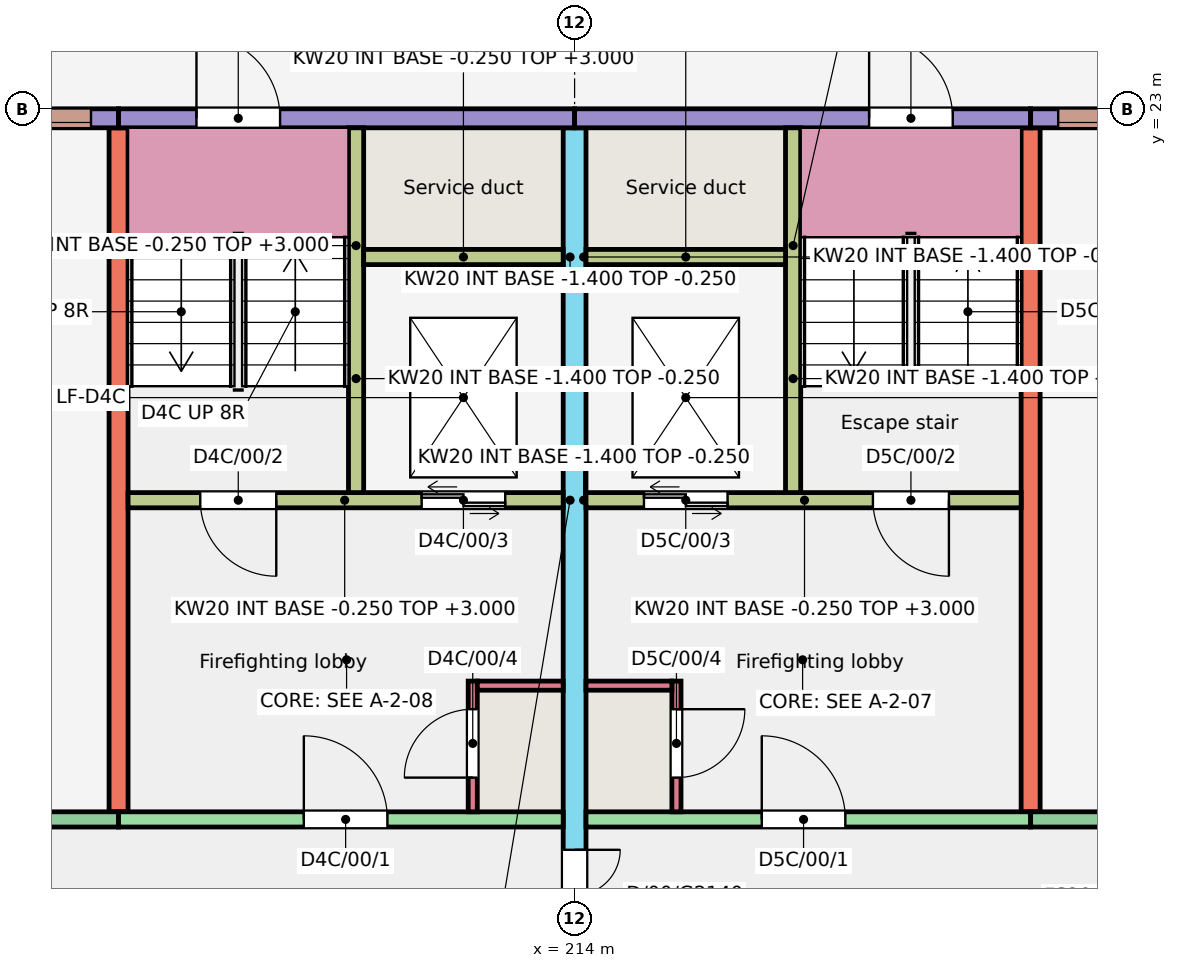
"""IFC4 building model, lengths in metres.
Left out: names, types, materials, properties, quantities, classifications, styles, units other than length and angle.
Written with IfcOpenShell. Run it as: python <this file> out.ifc"""

import sys

from ifc_helpers import new_model, si_unit, direction, frame, frame_2d, origin, place, context, subcontext, project, spatial, rectangle, extrude, element, fill, save


model = new_model("IFC4")
c1 = context("Model", 3, precision=1e-05, world=origin(), true_north=direction((0.0, 1.0)))
c2 = subcontext(c1, "Body", "Model", "MODEL_VIEW")
j1 = project(units=[si_unit("LENGTHUNIT", "METRE"), si_unit("PLANEANGLEUNIT", "RADIAN")], contexts=[c1])
p1 = place(None, origin())
s1 = spatial("IfcSite", under=j1, at=p1, CompositionType="ELEMENT")
p2 = place(p1, origin())
s2 = spatial("IfcBuilding", under=s1, at=p2, CompositionType="ELEMENT")
p3 = place(p2, origin())
s3 = spatial("IfcBuildingStorey", under=s2, at=p3, CompositionType="ELEMENT", Elevation=0.0)
p4 = place(p3, frame((208.0, 13.75, -0.25), z_axis=(0.0, 0.0, 1.0), x_axis=(0.0, 1.0, 0.0)))
e1 = element("IfcWall", 1, at=p4, inside=s3, PredefinedType="SHEAR", context=c2, shape_type="SweptSolid", body=[
    extrude(rectangle(XDim=9.0, YDim=0.25, at=frame_2d((4.5, 0.0))), origin(), (0.0, 0.0, 1.0), 3.25),
])
p5 = place(p3, frame((214.0, 11.75, -0.25), z_axis=(0.0, 0.0, 1.0), x_axis=(0.0, 1.0, 0.0)))
e2 = element("IfcWall", 2, at=p5, inside=s3, PredefinedType="SHEAR", context=c2, shape_type="SweptSolid", body=[
    extrude(rectangle(XDim=11.0, YDim=0.3, at=frame_2d((5.5, 0.0))), origin(), (0.0, 0.0, 1.0), 3.25),
])
p6 = place(p5, frame((0.3, 0.0, 0.25)))
e3 = element("IfcOpeningElement", 3, at=p6, cuts=e2, PredefinedType="OPENING", context=c2, shape_type="SweptSolid", body=[
    extrude(rectangle(XDim=1.2, YDim=2.1, at=frame_2d((0.6, 1.05))), frame((0.0, 0.16, 0.0), z_axis=(0.0, -1.0, 0.0), x_axis=(1.0, 0.0, 0.0)), (0.0, 0.0, 1.0), 0.32),
])
p7 = place(p3, frame((220.0, 13.75, -0.25), z_axis=(0.0, 0.0, 1.0), x_axis=(0.0, 1.0, 0.0)))
e4 = element("IfcWall", 4, at=p7, inside=s3, PredefinedType="SHEAR", context=c2, shape_type="SweptSolid", body=[
    extrude(rectangle(XDim=9.0, YDim=0.25, at=frame_2d((4.5, 0.0))), origin(), (0.0, 0.0, 1.0), 3.25),
])
p8 = place(p3, frame((204.4, 22.875, -0.25), z_axis=(0.0, 0.0, 1.0), x_axis=(1.0, 0.0, 0.0)))
e5 = element("IfcWall", 5, at=p8, inside=s3, PredefinedType="SOLIDWALL", context=c2, shape_type="SweptSolid", body=[
    extrude(rectangle(XDim=3.6, YDim=0.25, at=frame_2d((1.8, 0.0))), origin(), (0.0, 0.0, 1.0), 3.25),
])
p9 = place(p8, frame((2.637, 0.0, 2.05)))
e6 = element("IfcOpeningElement", 6, at=p9, cuts=e5, PredefinedType="OPENING", context=c2, shape_type="SweptSolid", body=[
    extrude(rectangle(XDim=0.6, YDim=0.6, at=frame_2d((0.3, 0.3))), frame((0.0, 0.135, 0.0), z_axis=(0.0, -1.0, 0.0), x_axis=(1.0, 0.0, 0.0)), (0.0, 0.0, 1.0), 0.27),
])
p10 = place(p8, frame((1.3, 0.0, 0.25)))
e7 = element("IfcOpeningElement", 7, at=p10, cuts=e5, PredefinedType="OPENING", context=c2, shape_type="SweptSolid", body=[
    extrude(rectangle(XDim=1.0, YDim=2.1, at=frame_2d((0.5, 1.05))), frame((0.0, 0.135, 0.0), z_axis=(0.0, -1.0, 0.0), x_axis=(1.0, 0.0, 0.0)), (0.0, 0.0, 1.0), 0.27),
])
p11 = place(p3, frame((204.4, 13.65, -0.25), z_axis=(0.0, 0.0, 1.0), x_axis=(1.0, 0.0, 0.0)))
e8 = element("IfcWall", 8, at=p11, inside=s3, PredefinedType="SOLIDWALL", context=c2, shape_type="SweptSolid", body=[
    extrude(rectangle(XDim=3.6, YDim=0.2, at=frame_2d((1.8, 0.0))), origin(), (0.0, 0.0, 1.0), 3.25),
])
p12 = place(p11, frame((1.3, 0.0, 0.25)))
e9 = element("IfcOpeningElement", 9, at=p12, cuts=e8, PredefinedType="OPENING", context=c2, shape_type="SweptSolid", body=[
    extrude(rectangle(XDim=1.0, YDim=2.1, at=frame_2d((0.5, 1.05))), frame((0.0, 0.11, 0.0), z_axis=(0.0, -1.0, 0.0), x_axis=(1.0, 0.0, 0.0)), (0.0, 0.0, 1.0), 0.22),
])
p13 = place(p3, frame((208.0, 22.875, -0.25), z_axis=(0.0, 0.0, 1.0), x_axis=(1.0, 0.0, 0.0)))
e10 = element("IfcWall", 10, at=p13, inside=s3, PredefinedType="SOLIDWALL", context=c2, shape_type="SweptSolid", body=[
    extrude(rectangle(XDim=6.0, YDim=0.25, at=frame_2d((3.0, 0.0))), origin(), (0.0, 0.0, 1.0), 3.25),
])
p14 = place(p13, frame((1.025, 0.0, 0.25)))
e11 = element("IfcOpeningElement", 11, at=p14, cuts=e10, PredefinedType="OPENING", context=c2, shape_type="SweptSolid", body=[
    extrude(rectangle(XDim=1.1, YDim=2.1, at=frame_2d((0.55, 1.05))), frame((0.0, 0.135, 0.0), z_axis=(0.0, -1.0, 0.0), x_axis=(1.0, 0.0, 0.0)), (0.0, 0.0, 1.0), 0.27),
])
p15 = place(p3, frame((208.0, 13.65, -0.25), z_axis=(0.0, 0.0, 1.0), x_axis=(1.0, 0.0, 0.0)))
e12 = element("IfcWall", 12, at=p15, inside=s3, PredefinedType="SHEAR", context=c2, shape_type="SweptSolid", body=[
    extrude(rectangle(XDim=5.85, YDim=0.2, at=frame_2d((2.925, 0.0))), origin(), (0.0, 0.0, 1.0), 3.25),
])
p16 = place(p15, frame((2.438, 0.0, 0.25)))
e13 = element("IfcOpeningElement", 13, at=p16, cuts=e12, PredefinedType="OPENING", context=c2, shape_type="SweptSolid", body=[
    extrude(rectangle(XDim=1.1, YDim=2.1, at=frame_2d((0.55, 1.05))), frame((0.0, 0.11, 0.0), z_axis=(0.0, -1.0, 0.0), x_axis=(1.0, 0.0, 0.0)), (0.0, 0.0, 1.0), 0.22),
])
p17 = place(p3, frame((208.125, 17.85, -0.25), z_axis=(0.0, 0.0, 1.0), x_axis=(1.0, 0.0, 0.0)))
e14 = element("IfcWall", 14, at=p17, inside=s3, PredefinedType="SHEAR", context=c2, shape_type="SweptSolid", body=[
    extrude(rectangle(XDim=5.725, YDim=0.2, at=frame_2d((2.863, 0.0))), origin(), (0.0, 0.0, 1.0), 3.25),
])
p18 = place(p17, frame((0.95, 0.0, 0.25)))
e15 = element("IfcOpeningElement", 15, at=p18, cuts=e14, PredefinedType="OPENING", context=c2, shape_type="SweptSolid", body=[
    extrude(rectangle(XDim=1.0, YDim=2.1, at=frame_2d((0.5, 1.05))), frame((0.0, 0.11, 0.0), z_axis=(0.0, -1.0, 0.0), x_axis=(1.0, 0.0, 0.0)), (0.0, 0.0, 1.0), 0.22),
])
p19 = place(p17, frame((3.863, 0.0, 0.25)))
e16 = element("IfcOpeningElement", 16, at=p19, cuts=e14, PredefinedType="OPENING", context=c2, shape_type="SweptSolid", body=[
    extrude(rectangle(XDim=1.1, YDim=2.1, at=frame_2d((0.55, 1.05))), frame((0.0, 0.11, 0.0), z_axis=(0.0, -1.0, 0.0), x_axis=(1.0, 0.0, 0.0)), (0.0, 0.0, 1.0), 0.22),
])
p20 = place(p3, frame((211.125, 17.95, -0.25), z_axis=(0.0, 0.0, 1.0), x_axis=(0.0, 1.0, 0.0)))
e17 = element("IfcWall", 17, at=p20, inside=s3, PredefinedType="SHEAR", context=c2, shape_type="SweptSolid", body=[
    extrude(rectangle(XDim=4.8, YDim=0.2, at=frame_2d((2.4, 0.0))), origin(), (0.0, 0.0, 1.0), 3.25),
])
p21 = place(p3, frame((211.225, 21.05, -0.25), z_axis=(0.0, 0.0, 1.0), x_axis=(1.0, 0.0, 0.0)))
e18 = element("IfcWall", 18, at=p21, inside=s3, PredefinedType="SHEAR", context=c2, shape_type="SweptSolid", body=[
    extrude(rectangle(XDim=2.625, YDim=0.2, at=frame_2d((1.312, 0.0))), origin(), (0.0, 0.0, 1.0), 3.25),
])
p22 = place(p3, frame((212.66, 13.75, -0.25), z_axis=(0.0, 0.0, 1.0), x_axis=(0.0, 1.0, 0.0)))
e19 = element("IfcWall", 19, at=p22, inside=s3, PredefinedType="SHEAR", context=c2, shape_type="SweptSolid", body=[
    extrude(rectangle(XDim=1.72, YDim=0.12, at=frame_2d((0.86, 0.0))), origin(), (0.0, 0.0, 1.0), 3.25),
])
p23 = place(p22, frame((0.45, 0.0, 0.25)))
e20 = element("IfcOpeningElement", 20, at=p23, cuts=e19, PredefinedType="OPENING", context=c2, shape_type="SweptSolid", body=[
    extrude(rectangle(XDim=0.9, YDim=2.1, at=frame_2d((0.45, 1.05))), frame((0.0, 0.07, 0.0), z_axis=(0.0, -1.0, 0.0), x_axis=(1.0, 0.0, 0.0)), (0.0, 0.0, 1.0), 0.14),
])
p24 = place(p3, frame((212.72, 15.41, -0.25), z_axis=(0.0, 0.0, 1.0), x_axis=(1.0, 0.0, 0.0)))
e21 = element("IfcWall", 21, at=p24, inside=s3, PredefinedType="SHEAR", context=c2, shape_type="SweptSolid", body=[
    extrude(rectangle(XDim=1.13, YDim=0.12, at=frame_2d((0.565, 0.0))), origin(), (0.0, 0.0, 1.0), 3.25),
])
p25 = place(p3, frame((214.0, 22.875, -0.25), z_axis=(0.0, 0.0, 1.0), x_axis=(1.0, 0.0, 0.0)))
e22 = element("IfcWall", 22, at=p25, inside=s3, PredefinedType="SOLIDWALL", context=c2, shape_type="SweptSolid", body=[
    extrude(rectangle(XDim=6.0, YDim=0.25, at=frame_2d((3.0, 0.0))), origin(), (0.0, 0.0, 1.0), 3.25),
])
p26 = place(p25, frame((3.875, 0.0, 0.25)))
e23 = element("IfcOpeningElement", 23, at=p26, cuts=e22, PredefinedType="OPENING", context=c2, shape_type="SweptSolid", body=[
    extrude(rectangle(XDim=1.1, YDim=2.1, at=frame_2d((0.55, 1.05))), frame((0.0, 0.135, 0.0), z_axis=(0.0, -1.0, 0.0), x_axis=(1.0, 0.0, 0.0)), (0.0, 0.0, 1.0), 0.27),
])
p27 = place(p3, frame((214.15, 13.65, -0.25), z_axis=(0.0, 0.0, 1.0), x_axis=(1.0, 0.0, 0.0)))
e24 = element("IfcWall", 24, at=p27, inside=s3, PredefinedType="SHEAR", context=c2, shape_type="SweptSolid", body=[
    extrude(rectangle(XDim=5.85, YDim=0.2, at=frame_2d((2.925, 0.0))), origin(), (0.0, 0.0, 1.0), 3.25),
])
p28 = place(p27, frame((2.312, 0.0, 0.25)))
e25 = element("IfcOpeningElement", 25, at=p28, cuts=e24, PredefinedType="OPENING", context=c2, shape_type="SweptSolid", body=[
    extrude(rectangle(XDim=1.1, YDim=2.1, at=frame_2d((0.55, 1.05))), frame((0.0, 0.11, 0.0), z_axis=(0.0, -1.0, 0.0), x_axis=(1.0, 0.0, 0.0)), (0.0, 0.0, 1.0), 0.22),
])
p29 = place(p3, frame((214.15, 17.85, -0.25), z_axis=(0.0, 0.0, 1.0), x_axis=(1.0, 0.0, 0.0)))
e26 = element("IfcWall", 26, at=p29, inside=s3, PredefinedType="SHEAR", context=c2, shape_type="SweptSolid", body=[
    extrude(rectangle(XDim=5.725, YDim=0.2, at=frame_2d((2.863, 0.0))), origin(), (0.0, 0.0, 1.0), 3.25),
])
p30 = place(p29, frame((3.775, 0.0, 0.25)))
e27 = element("IfcOpeningElement", 27, at=p30, cuts=e26, PredefinedType="OPENING", context=c2, shape_type="SweptSolid", body=[
    extrude(rectangle(XDim=1.0, YDim=2.1, at=frame_2d((0.5, 1.05))), frame((0.0, 0.11, 0.0), z_axis=(0.0, -1.0, 0.0), x_axis=(1.0, 0.0, 0.0)), (0.0, 0.0, 1.0), 0.22),
])
p31 = place(p29, frame((0.762, 0.0, 0.25)))
e28 = element("IfcOpeningElement", 28, at=p31, cuts=e26, PredefinedType="OPENING", context=c2, shape_type="SweptSolid", body=[
    extrude(rectangle(XDim=1.1, YDim=2.1, at=frame_2d((0.55, 1.05))), frame((0.0, 0.11, 0.0), z_axis=(0.0, -1.0, 0.0), x_axis=(1.0, 0.0, 0.0)), (0.0, 0.0, 1.0), 0.22),
])
p32 = place(p3, frame((216.875, 17.95, -0.25), z_axis=(0.0, 0.0, 1.0), x_axis=(0.0, 1.0, 0.0)))
e29 = element("IfcWall", 29, at=p32, inside=s3, PredefinedType="SHEAR", context=c2, shape_type="SweptSolid", body=[
    extrude(rectangle(XDim=4.8, YDim=0.2, at=frame_2d((2.4, 0.0))), origin(), (0.0, 0.0, 1.0), 3.25),
])
p33 = place(p3, frame((214.15, 21.05, -0.25), z_axis=(0.0, 0.0, 1.0), x_axis=(1.0, 0.0, 0.0)))
e30 = element("IfcWall", 30, at=p33, inside=s3, PredefinedType="SHEAR", context=c2, shape_type="SweptSolid", body=[
    extrude(rectangle(XDim=2.625, YDim=0.2, at=frame_2d((1.312, 0.0))), origin(), (0.0, 0.0, 1.0), 3.25),
])
p34 = place(p3, frame((215.34, 13.75, -0.25), z_axis=(0.0, 0.0, 1.0), x_axis=(0.0, 1.0, 0.0)))
e31 = element("IfcWall", 31, at=p34, inside=s3, PredefinedType="SHEAR", context=c2, shape_type="SweptSolid", body=[
    extrude(rectangle(XDim=1.72, YDim=0.12, at=frame_2d((0.86, 0.0))), origin(), (0.0, 0.0, 1.0), 3.25),
])
p35 = place(p34, frame((0.45, 0.0, 0.25)))
e32 = element("IfcOpeningElement", 32, at=p35, cuts=e31, PredefinedType="OPENING", context=c2, shape_type="SweptSolid", body=[
    extrude(rectangle(XDim=0.9, YDim=2.1, at=frame_2d((0.45, 1.05))), frame((0.0, 0.07, 0.0), z_axis=(0.0, -1.0, 0.0), x_axis=(1.0, 0.0, 0.0)), (0.0, 0.0, 1.0), 0.14),
])
p36 = place(p3, frame((214.15, 15.41, -0.25), z_axis=(0.0, 0.0, 1.0), x_axis=(1.0, 0.0, 0.0)))
e33 = element("IfcWall", 33, at=p36, inside=s3, PredefinedType="SHEAR", context=c2, shape_type="SweptSolid", body=[
    extrude(rectangle(XDim=1.13, YDim=0.12, at=frame_2d((0.565, 0.0))), origin(), (0.0, 0.0, 1.0), 3.25),
])
p37 = place(p3, frame((220.0, 22.875, -0.25), z_axis=(0.0, 0.0, 1.0), x_axis=(1.0, 0.0, 0.0)))
e34 = element("IfcWall", 34, at=p37, inside=s3, PredefinedType="SOLIDWALL", context=c2, shape_type="SweptSolid", body=[
    extrude(rectangle(XDim=3.6, YDim=0.25, at=frame_2d((1.8, 0.0))), origin(), (0.0, 0.0, 1.0), 3.25),
])
p38 = place(p37, frame((0.363, 0.0, 2.05)))
e35 = element("IfcOpeningElement", 35, at=p38, cuts=e34, PredefinedType="OPENING", context=c2, shape_type="SweptSolid", body=[
    extrude(rectangle(XDim=0.6, YDim=0.6, at=frame_2d((0.3, 0.3))), frame((0.0, 0.135, 0.0), z_axis=(0.0, -1.0, 0.0), x_axis=(1.0, 0.0, 0.0)), (0.0, 0.0, 1.0), 0.27),
])
p39 = place(p37, frame((1.3, 0.0, 0.25)))
e36 = element("IfcOpeningElement", 36, at=p39, cuts=e34, PredefinedType="OPENING", context=c2, shape_type="SweptSolid", body=[
    extrude(rectangle(XDim=1.0, YDim=2.1, at=frame_2d((0.5, 1.05))), frame((0.0, 0.135, 0.0), z_axis=(0.0, -1.0, 0.0), x_axis=(1.0, 0.0, 0.0)), (0.0, 0.0, 1.0), 0.27),
])
p40 = place(p3, frame((220.0, 13.65, -0.25), z_axis=(0.0, 0.0, 1.0), x_axis=(1.0, 0.0, 0.0)))
e37 = element("IfcWall", 37, at=p40, inside=s3, PredefinedType="SOLIDWALL", context=c2, shape_type="SweptSolid", body=[
    extrude(rectangle(XDim=3.6, YDim=0.2, at=frame_2d((1.8, 0.0))), origin(), (0.0, 0.0, 1.0), 3.25),
])
p41 = place(p40, frame((1.3, 0.0, 0.25)))
e38 = element("IfcOpeningElement", 38, at=p41, cuts=e37, PredefinedType="OPENING", context=c2, shape_type="SweptSolid", body=[
    extrude(rectangle(XDim=1.0, YDim=2.1, at=frame_2d((0.5, 1.05))), frame((0.0, 0.11, 0.0), z_axis=(0.0, -1.0, 0.0), x_axis=(1.0, 0.0, 0.0)), (0.0, 0.0, 1.0), 0.22),
])
for number, where, z_axis, x_axis in (
    (39, (211.025, 17.85, -1.4), (0.0, 0.0, 1.0), (1.0, 0.0, 0.0)),
    (40, (211.025, 21.05, -1.4), (0.0, 0.0, 1.0), (1.0, 0.0, 0.0)),
):
    element("IfcWall", number, at=place(p3, frame(where, z_axis=z_axis, x_axis=x_axis)), inside=s3, PredefinedType="SHEAR", context=c2, shape_type="SweptSolid", body=[
        extrude(rectangle(XDim=2.975, YDim=0.2, at=frame_2d((1.488, 0.0))), origin(), (0.0, 0.0, 1.0), 1.15),
    ])
p42 = place(p3, frame((211.125, 17.95, -1.4), z_axis=(0.0, 0.0, 1.0), x_axis=(0.0, 1.0, 0.0)))
e41 = element("IfcWall", 41, at=p42, inside=s3, PredefinedType="SHEAR", context=c2, shape_type="SweptSolid", body=[
    extrude(rectangle(XDim=3.0, YDim=0.2, at=frame_2d((1.5, 0.0))), origin(), (0.0, 0.0, 1.0), 1.15),
])
p43 = place(p3, frame((213.925, 17.95, -1.4), z_axis=(0.0, 0.0, 1.0), x_axis=(0.0, 1.0, 0.0)))
e42 = element("IfcWall", 42, at=p43, inside=s3, PredefinedType="SHEAR", context=c2, shape_type="SweptSolid", body=[
    extrude(rectangle(XDim=3.0, YDim=0.15, at=frame_2d((1.5, 0.0))), origin(), (0.0, 0.0, 1.0), 1.15),
])
for number, where, z_axis, x_axis in (
    (43, (214.0, 17.85, -1.4), (0.0, 0.0, 1.0), (1.0, 0.0, 0.0)),
    (44, (214.0, 21.05, -1.4), (0.0, 0.0, 1.0), (1.0, 0.0, 0.0)),
):
    element("IfcWall", number, at=place(p3, frame(where, z_axis=z_axis, x_axis=x_axis)), inside=s3, PredefinedType="SHEAR", context=c2, shape_type="SweptSolid", body=[
        extrude(rectangle(XDim=2.975, YDim=0.2, at=frame_2d((1.488, 0.0))), origin(), (0.0, 0.0, 1.0), 1.15),
    ])
p44 = place(p3, frame((216.875, 17.95, -1.4), z_axis=(0.0, 0.0, 1.0), x_axis=(0.0, 1.0, 0.0)))
e45 = element("IfcWall", 45, at=p44, inside=s3, PredefinedType="SHEAR", context=c2, shape_type="SweptSolid", body=[
    extrude(rectangle(XDim=3.0, YDim=0.2, at=frame_2d((1.5, 0.0))), origin(), (0.0, 0.0, 1.0), 1.15),
])
p45 = place(p3, frame((214.075, 17.95, -1.4), z_axis=(0.0, 0.0, 1.0), x_axis=(0.0, 1.0, 0.0)))
e46 = element("IfcWall", 46, at=p45, inside=s3, PredefinedType="SHEAR", context=c2, shape_type="SweptSolid", body=[
    extrude(rectangle(XDim=3.0, YDim=0.15, at=frame_2d((1.5, 0.0))), origin(), (0.0, 0.0, 1.0), 1.15),
])
p46 = place(p9, origin())
e47 = element("IfcWindow", 47, at=p46, inside=s3, PartitioningType="SINGLE_PANEL", PredefinedType="WINDOW", context=c2, shape_type="SweptSolid", body=[
    extrude(rectangle(XDim=0.6, YDim=0.6, at=frame_2d((0.3, 0.3))), frame((0.0, -0.025, 0.0), z_axis=(0.0, -1.0, 0.0), x_axis=(1.0, 0.0, 0.0)), (0.0, 0.0, 1.0), 0.06),
])
fill(e6, e47)
p47 = place(p38, origin())
e48 = element("IfcWindow", 48, at=p47, inside=s3, PartitioningType="SINGLE_PANEL", PredefinedType="WINDOW", context=c2, shape_type="SweptSolid", body=[
    extrude(rectangle(XDim=0.6, YDim=0.6, at=frame_2d((0.3, 0.3))), frame((0.0, -0.025, 0.0), z_axis=(0.0, -1.0, 0.0), x_axis=(1.0, 0.0, 0.0)), (0.0, 0.0, 1.0), 0.06),
])
fill(e35, e48)
p48 = place(p16, origin())
e49 = element("IfcDoor", 49, at=p48, inside=s3, OperationType="SINGLE_SWING_LEFT", PredefinedType="DOOR", context=c2, shape_type="SweptSolid", body=[
    extrude(rectangle(XDim=1.1, YDim=2.1, at=frame_2d((0.55, 1.05))), frame((0.0, 0.025, 0.0), z_axis=(0.0, -1.0, 0.0), x_axis=(1.0, 0.0, 0.0)), (0.0, 0.0, 1.0), 0.05),
])
fill(e13, e49)
p49 = place(p18, origin())
e50 = element("IfcDoor", 50, at=p49, inside=s3, OperationType="SINGLE_SWING_RIGHT", PredefinedType="DOOR", context=c2, shape_type="SweptSolid", body=[
    extrude(rectangle(XDim=1.0, YDim=2.1, at=frame_2d((0.5, 1.05))), frame((0.0, 0.025, 0.0), z_axis=(0.0, -1.0, 0.0), x_axis=(1.0, 0.0, 0.0)), (0.0, 0.0, 1.0), 0.05),
])
fill(e15, e50)
p50 = place(p19, origin())
e51 = element("IfcDoor", 51, at=p50, inside=s3, OperationType="DOUBLE_DOOR_SLIDING", PredefinedType="DOOR", context=c2, shape_type="SweptSolid", body=[
    extrude(rectangle(XDim=1.1, YDim=2.1, at=frame_2d((0.55, 1.05))), frame((0.0, 0.025, 0.0), z_axis=(0.0, -1.0, 0.0), x_axis=(1.0, 0.0, 0.0)), (0.0, 0.0, 1.0), 0.05),
])
fill(e16, e51)
p51 = place(p23, origin())
e52 = element("IfcDoor", 52, at=p51, inside=s3, OperationType="SINGLE_SWING_LEFT", PredefinedType="DOOR", context=c2, shape_type="SweptSolid", body=[
    extrude(rectangle(XDim=0.9, YDim=2.1, at=frame_2d((0.45, 1.05))), frame((0.0, 0.025, 0.0), z_axis=(0.0, -1.0, 0.0), x_axis=(1.0, 0.0, 0.0)), (0.0, 0.0, 1.0), 0.05),
])
fill(e20, e52)
p52 = place(p14, origin())
e53 = element("IfcDoor", 53, at=p52, inside=s3, OperationType="SINGLE_SWING_LEFT", PredefinedType="DOOR", context=c2, shape_type="SweptSolid", body=[
    extrude(rectangle(XDim=1.1, YDim=2.1, at=frame_2d((0.55, 1.05))), frame((0.0, 0.025, 0.0), z_axis=(0.0, -1.0, 0.0), x_axis=(1.0, 0.0, 0.0)), (0.0, 0.0, 1.0), 0.05),
])
fill(e11, e53)
p53 = place(p28, origin())
e54 = element("IfcDoor", 54, at=p53, inside=s3, OperationType="SINGLE_SWING_LEFT", PredefinedType="DOOR", context=c2, shape_type="SweptSolid", body=[
    extrude(rectangle(XDim=1.1, YDim=2.1, at=frame_2d((0.55, 1.05))), frame((0.0, 0.025, 0.0), z_axis=(0.0, -1.0, 0.0), x_axis=(1.0, 0.0, 0.0)), (0.0, 0.0, 1.0), 0.05),
])
fill(e25, e54)
p54 = place(p30, origin())
e55 = element("IfcDoor", 55, at=p54, inside=s3, OperationType="SINGLE_SWING_RIGHT", PredefinedType="DOOR", context=c2, shape_type="SweptSolid", body=[
    extrude(rectangle(XDim=1.0, YDim=2.1, at=frame_2d((0.5, 1.05))), frame((0.0, 0.025, 0.0), z_axis=(0.0, -1.0, 0.0), x_axis=(1.0, 0.0, 0.0)), (0.0, 0.0, 1.0), 0.05),
])
fill(e27, e55)
p55 = place(p31, origin())
e56 = element("IfcDoor", 56, at=p55, inside=s3, OperationType="DOUBLE_DOOR_SLIDING", PredefinedType="DOOR", context=c2, shape_type="SweptSolid", body=[
    extrude(rectangle(XDim=1.1, YDim=2.1, at=frame_2d((0.55, 1.05))), frame((0.0, 0.025, 0.0), z_axis=(0.0, -1.0, 0.0), x_axis=(1.0, 0.0, 0.0)), (0.0, 0.0, 1.0), 0.05),
])
fill(e28, e56)
p56 = place(p35, origin())
e57 = element("IfcDoor", 57, at=p56, inside=s3, OperationType="SINGLE_SWING_RIGHT", PredefinedType="DOOR", context=c2, shape_type="SweptSolid", body=[
    extrude(rectangle(XDim=0.9, YDim=2.1, at=frame_2d((0.45, 1.05))), frame((0.0, 0.025, 0.0), z_axis=(0.0, -1.0, 0.0), x_axis=(1.0, 0.0, 0.0)), (0.0, 0.0, 1.0), 0.05),
])
fill(e32, e57)
p57 = place(p26, origin())
e58 = element("IfcDoor", 58, at=p57, inside=s3, OperationType="SINGLE_SWING_LEFT", PredefinedType="DOOR", context=c2, shape_type="SweptSolid", body=[
    extrude(rectangle(XDim=1.1, YDim=2.1, at=frame_2d((0.55, 1.05))), frame((0.0, 0.025, 0.0), z_axis=(0.0, -1.0, 0.0), x_axis=(1.0, 0.0, 0.0)), (0.0, 0.0, 1.0), 0.05),
])
fill(e23, e58)
p58 = place(p6, origin())
e59 = element("IfcDoor", 59, at=p58, inside=s3, OperationType="DOUBLE_DOOR_SINGLE_SWING", PredefinedType="DOOR", context=c2, shape_type="SweptSolid", body=[
    extrude(rectangle(XDim=1.2, YDim=2.1, at=frame_2d((0.6, 1.05))), frame((0.0, 0.025, 0.0), z_axis=(0.0, -1.0, 0.0), x_axis=(1.0, 0.0, 0.0)), (0.0, 0.0, 1.0), 0.05),
])
fill(e3, e59)
save(model, sys.argv[1])
